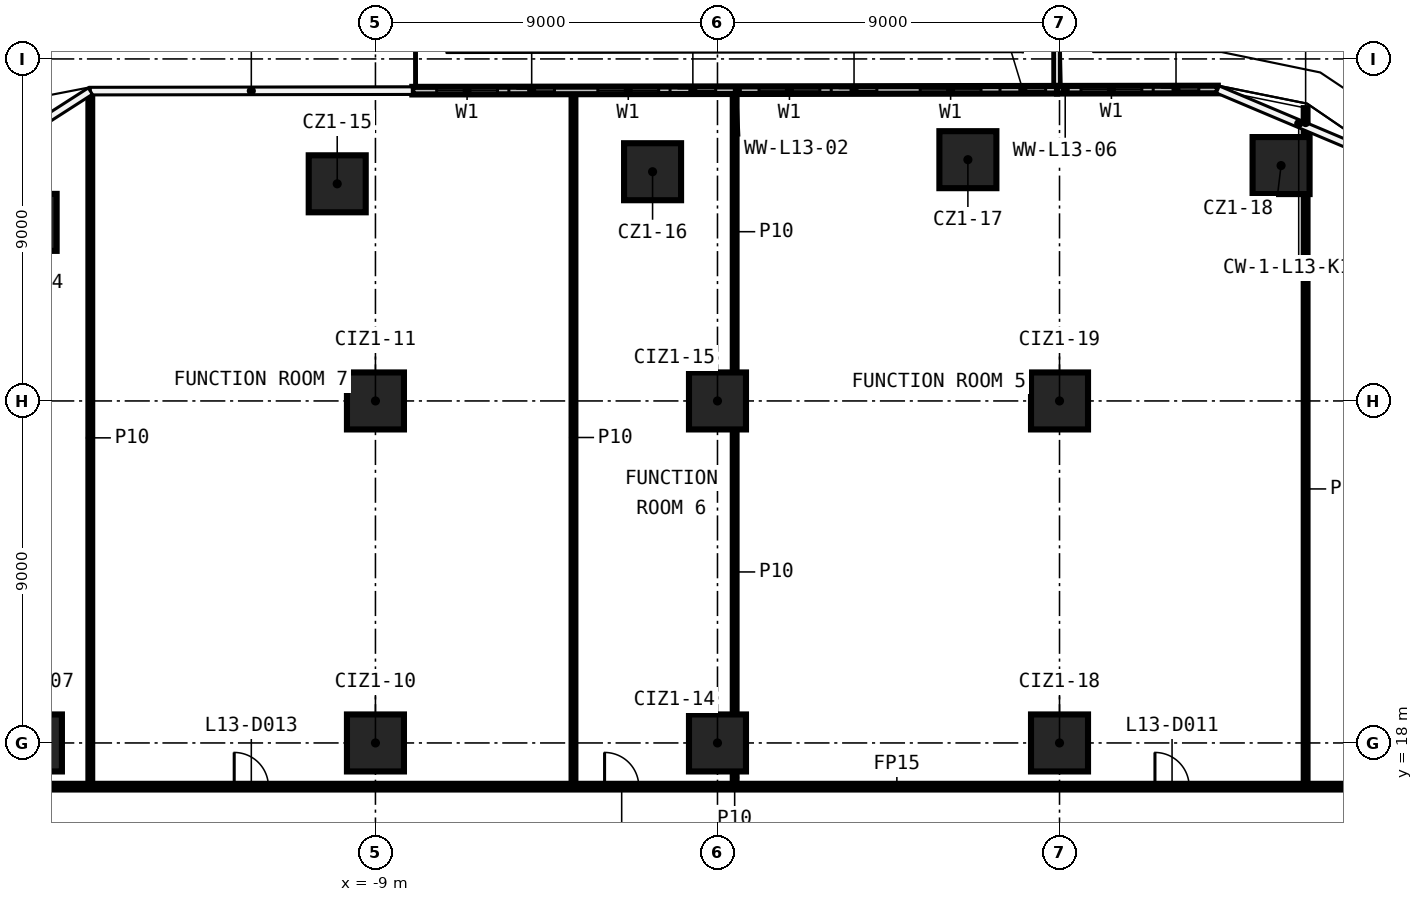
"""IFC4 building model, lengths in metres.
Left out: names, types, materials, properties, quantities, classifications, styles, units other than length and angle.
Written with IfcOpenShell. Run it as: python <this file> out.ifc"""

import sys

from ifc_helpers import new_model, si_unit, direction, frame, frame_2d, origin, origin_2d, place, context, subcontext, project, spatial, rectangle, extrude, element, fill, save


model = new_model("IFC4")
c1 = context("Model", 3, precision=1e-05, world=origin(), true_north=direction((0.0, 1.0)))
c2 = subcontext(c1, "Body", "Model", "MODEL_VIEW")
j1 = project(units=[si_unit("LENGTHUNIT", "METRE"), si_unit("PLANEANGLEUNIT", "RADIAN")], contexts=[c1])
p1 = place(None, origin())
s1 = spatial("IfcSite", under=j1, at=p1, CompositionType="ELEMENT")
p2 = place(p1, origin())
s2 = spatial("IfcBuilding", under=s1, at=p2, CompositionType="ELEMENT")
p3 = place(p2, frame((0.0, 0.0, 69.9)))
s3 = spatial("IfcBuildingStorey", under=s2, at=p3, CompositionType="ELEMENT", Elevation=69.9)
for number, where, z_axis, x_axis in (
    (1, (-18.139, 31.699, 0.0), (0.0, 0.0, 1.0), (1.0, 0.0, 0.0)),
    (2, (-10.006, 32.714, 0.0), (0.0, 0.0, 1.0), (1.0, 0.0, 0.0)),
    (3, (-1.708, 33.032, 0.0), (0.0, 0.0, 1.0), (1.0, 0.0, 0.0)),
    (4, (6.589, 33.349, 0.0), (0.0, 0.0, 1.0), (1.0, 0.0, 0.0)),
    (5, (14.83, 33.194, 0.0), (0.0, 0.0, 1.0), (1.0, 0.0, 0.0)),
    (6, (-18.0, 18.0, 0.0), (0.0, 0.0, 1.0), (1.0, 0.0, 0.0)),
    (7, (-9.0, 18.0, 0.0), (0.0, 0.0, 1.0), (1.0, 0.0, 0.0)),
    (8, (-9.0, 27.0, 0.0), (0.0, 0.0, 1.0), (1.0, 0.0, 0.0)),
    (9, (0.0, 18.0, 0.0), (0.0, 0.0, 1.0), (1.0, 0.0, 0.0)),
    (10, (0.0, 27.0, 0.0), (0.0, 0.0, 1.0), (1.0, 0.0, 0.0)),
    (11, (9.0, 18.0, 0.0), (0.0, 0.0, 1.0), (1.0, 0.0, 0.0)),
    (12, (9.0, 27.0, 0.0), (0.0, 0.0, 1.0), (1.0, 0.0, 0.0)),
):
    element("IfcColumn", number, at=place(p3, frame(where, z_axis=z_axis, x_axis=x_axis)), inside=s3, PredefinedType="COLUMN", context=c2, shape_type="SweptSolid", body=[
        extrude(rectangle(XDim=1.5, YDim=1.5, at=origin_2d()), origin(), (0.0, 0.0, 1.0), 3.3),
    ])
p4 = place(p3, frame((-19.925, 16.85, 0.0), z_axis=(0.0, 0.0, 1.0), x_axis=(1.0, 0.0, 0.0)))
e13 = element("IfcWall", 13, at=p4, inside=s3, PredefinedType="PARTITIONING", context=c2, shape_type="SweptSolid", body=[
    extrude(rectangle(XDim=39.85, YDim=0.15, at=frame_2d((19.925, 0.0))), origin(), (0.0, 0.0, 1.0), 3.3),
])
p5 = place(p4, frame((31.436, 0.0, 0.0)))
e14 = element("IfcOpeningElement", 14, at=p5, cuts=e13, PredefinedType="OPENING", context=c2, shape_type="SweptSolid", body=[
    extrude(rectangle(XDim=0.9, YDim=2.1, at=frame_2d((0.45, 1.05))), frame((0.0, 0.085, 0.0), z_axis=(0.0, -1.0, 0.0), x_axis=(1.0, 0.0, 0.0)), (0.0, 0.0, 1.0), 0.17),
])
p6 = place(p4, frame((16.954, 0.0, 0.0)))
e15 = element("IfcOpeningElement", 15, at=p6, cuts=e13, PredefinedType="OPENING", context=c2, shape_type="SweptSolid", body=[
    extrude(rectangle(XDim=0.9, YDim=2.1, at=frame_2d((0.45, 1.05))), frame((0.0, 0.085, 0.0), z_axis=(0.0, -1.0, 0.0), x_axis=(1.0, 0.0, 0.0)), (0.0, 0.0, 1.0), 0.17),
])
p7 = place(p4, frame((7.208, 0.0, 0.0)))
e16 = element("IfcOpeningElement", 16, at=p7, cuts=e13, PredefinedType="OPENING", context=c2, shape_type="SweptSolid", body=[
    extrude(rectangle(XDim=0.9, YDim=2.1, at=frame_2d((0.45, 1.05))), frame((0.0, 0.085, 0.0), z_axis=(0.0, -1.0, 0.0), x_axis=(1.0, 0.0, 0.0)), (0.0, 0.0, 1.0), 0.17),
])
p8 = place(p3, frame((15.476, 16.925, 0.0), z_axis=(0.0, 0.0, 1.0), x_axis=(0.0, 1.0, 0.0)))
e17 = element("IfcWall", 17, at=p8, inside=s3, PredefinedType="PARTITIONING", context=c2, shape_type="SweptSolid", body=[
    extrude(rectangle(XDim=15.519, YDim=0.1, at=frame_2d((7.76, 0.0))), origin(), (0.0, 0.0, 1.0), 3.3),
])
p9 = place(p3, frame((15.476, 33.944, 0.0), z_axis=(0.0, 0.0, 1.0), x_axis=(0.0, 1.0, 0.0)))
e18 = element("IfcWall", 18, at=p9, inside=s3, PredefinedType="PARTITIONING", context=c2, shape_type="SweptSolid", body=[
    extrude(rectangle(XDim=0.762, YDim=0.1, at=frame_2d((0.381, 0.0))), origin(), (0.0, 0.0, 1.0), 3.3),
])
p10 = place(p3, frame((0.452, 16.925, 0.0), z_axis=(0.0, 0.0, 1.0), x_axis=(0.0, 1.0, 0.0)))
e19 = element("IfcWall", 19, at=p10, inside=s3, PredefinedType="PARTITIONING", context=c2, shape_type="SweptSolid", body=[
    extrude(rectangle(XDim=0.325, YDim=0.1, at=frame_2d((0.163, 0.0))), origin(), (0.0, 0.0, 1.0), 3.3),
])
p11 = place(p3, frame((0.452, 18.75, 0.0), z_axis=(0.0, 0.0, 1.0), x_axis=(0.0, 1.0, 0.0)))
e20 = element("IfcWall", 20, at=p11, inside=s3, PredefinedType="PARTITIONING", context=c2, shape_type="SweptSolid", body=[
    extrude(rectangle(XDim=7.5, YDim=0.1, at=frame_2d((3.75, 0.0))), origin(), (0.0, 0.0, 1.0), 3.3),
])
p12 = place(p3, frame((0.452, 27.75, 0.0), z_axis=(0.0, 0.0, 1.0), x_axis=(0.0, 1.0, 0.0)))
e21 = element("IfcWall", 21, at=p12, inside=s3, PredefinedType="PARTITIONING", context=c2, shape_type="SweptSolid", body=[
    extrude(rectangle(XDim=7.407, YDim=0.1, at=frame_2d((3.704, 0.0))), origin(), (0.0, 0.0, 1.0), 3.3),
])
p13 = place(p3, frame((-3.789, 16.925, 0.0), z_axis=(0.0, 0.0, 1.0), x_axis=(0.0, 1.0, 0.0)))
e22 = element("IfcWall", 22, at=p13, inside=s3, PredefinedType="PARTITIONING", context=c2, shape_type="SweptSolid", body=[
    extrude(rectangle(XDim=18.226, YDim=0.1, at=frame_2d((9.113, 0.0))), origin(), (0.0, 0.0, 1.0), 3.3),
])
p14 = place(p3, frame((-16.503, 16.925, 0.0), z_axis=(0.0, 0.0, 1.0), x_axis=(0.0, 1.0, 0.0)))
e23 = element("IfcWall", 23, at=p14, inside=s3, PredefinedType="PARTITIONING", context=c2, shape_type="SweptSolid", body=[
    extrude(rectangle(XDim=18.208, YDim=0.1, at=frame_2d((9.104, 0.0))), origin(), (0.0, 0.0, 1.0), 3.3),
])
p15 = place(p3, frame((8.934, 35.19, 0.0), z_axis=(0.0, 0.0, 1.0), x_axis=(-0.999998964441, -0.001439137329, 0.0)))
e24 = element("IfcWall", 24, at=p15, inside=s3, PredefinedType="SOLIDWALL", context=c2, shape_type="SweptSolid", body=[
    extrude(rectangle(XDim=16.964, YDim=0.2, at=frame_2d((8.482, 0.0))), origin(), (0.0, 0.0, 1.0), 3.3),
])
p16 = place(p15, frame((2.0, 0.0, 0.6)))
e25 = element("IfcOpeningElement", 25, at=p16, cuts=e24, PredefinedType="OPENING", context=c2, shape_type="SweptSolid", body=[
    extrude(rectangle(XDim=1.6, YDim=2.4, at=frame_2d((0.8, 1.2))), frame((0.0, 0.11, 0.0), z_axis=(0.0, -1.0, 0.0), x_axis=(1.0, 0.0, 0.0)), (0.0, 0.0, 1.0), 0.22),
])
p17 = place(p15, frame((0.3, 0.0, 0.0)))
e26 = element("IfcOpeningElement", 26, at=p17, cuts=e24, PredefinedType="OPENING", context=c2, shape_type="SweptSolid", body=[
    extrude(rectangle(XDim=1.2, YDim=2.4, at=frame_2d((0.6, 1.2))), frame((0.0, 0.11, 0.0), z_axis=(0.0, -1.0, 0.0), x_axis=(1.0, 0.0, 0.0)), (0.0, 0.0, 1.0), 0.22),
])
p18 = place(p15, frame((6.241, 0.0, 0.6)))
e27 = element("IfcOpeningElement", 27, at=p18, cuts=e24, PredefinedType="OPENING", context=c2, shape_type="SweptSolid", body=[
    extrude(rectangle(XDim=1.6, YDim=2.4, at=frame_2d((0.8, 1.2))), frame((0.0, 0.11, 0.0), z_axis=(0.0, -1.0, 0.0), x_axis=(1.0, 0.0, 0.0)), (0.0, 0.0, 1.0), 0.22),
])
p19 = place(p15, frame((4.741, 0.0, 0.0)))
e28 = element("IfcOpeningElement", 28, at=p19, cuts=e24, PredefinedType="OPENING", context=c2, shape_type="SweptSolid", body=[
    extrude(rectangle(XDim=1.2, YDim=2.4, at=frame_2d((0.6, 1.2))), frame((0.0, 0.11, 0.0), z_axis=(0.0, -1.0, 0.0), x_axis=(1.0, 0.0, 0.0)), (0.0, 0.0, 1.0), 0.22),
])
p20 = place(p15, frame((10.482, 0.0, 0.6)))
e29 = element("IfcOpeningElement", 29, at=p20, cuts=e24, PredefinedType="OPENING", context=c2, shape_type="SweptSolid", body=[
    extrude(rectangle(XDim=1.6, YDim=2.4, at=frame_2d((0.8, 1.2))), frame((0.0, 0.11, 0.0), z_axis=(0.0, -1.0, 0.0), x_axis=(1.0, 0.0, 0.0)), (0.0, 0.0, 1.0), 0.22),
])
p21 = place(p15, frame((8.982, 0.0, 0.0)))
e30 = element("IfcOpeningElement", 30, at=p21, cuts=e24, PredefinedType="OPENING", context=c2, shape_type="SweptSolid", body=[
    extrude(rectangle(XDim=1.2, YDim=2.4, at=frame_2d((0.6, 1.2))), frame((0.0, 0.11, 0.0), z_axis=(0.0, -1.0, 0.0), x_axis=(1.0, 0.0, 0.0)), (0.0, 0.0, 1.0), 0.22),
])
p22 = place(p15, frame((14.723, 0.0, 0.6)))
e31 = element("IfcOpeningElement", 31, at=p22, cuts=e24, PredefinedType="OPENING", context=c2, shape_type="SweptSolid", body=[
    extrude(rectangle(XDim=1.6, YDim=2.4, at=frame_2d((0.8, 1.2))), frame((0.0, 0.11, 0.0), z_axis=(0.0, -1.0, 0.0), x_axis=(1.0, 0.0, 0.0)), (0.0, 0.0, 1.0), 0.22),
])
p23 = place(p15, frame((13.223, 0.0, 0.0)))
e32 = element("IfcOpeningElement", 32, at=p23, cuts=e24, PredefinedType="OPENING", context=c2, shape_type="SweptSolid", body=[
    extrude(rectangle(XDim=1.2, YDim=2.4, at=frame_2d((0.6, 1.2))), frame((0.0, 0.11, 0.0), z_axis=(0.0, -1.0, 0.0), x_axis=(1.0, 0.0, 0.0)), (0.0, 0.0, 1.0), 0.22),
])
p24 = place(p3, frame((13.166, 35.196, 0.0), z_axis=(0.0, 0.0, 1.0), x_axis=(-0.999998959596, -0.001442500374, 0.0)))
e33 = element("IfcWall", 33, at=p24, inside=s3, PredefinedType="SOLIDWALL", context=c2, shape_type="SweptSolid", body=[
    extrude(rectangle(XDim=4.231, YDim=0.2, at=frame_2d((2.116, 0.0))), origin(), (0.0, 0.0, 1.0), 3.3),
])
p25 = place(p24, frame((2.0, 0.0, 0.6)))
e34 = element("IfcOpeningElement", 34, at=p25, cuts=e33, PredefinedType="OPENING", context=c2, shape_type="SweptSolid", body=[
    extrude(rectangle(XDim=1.6, YDim=2.4, at=frame_2d((0.8, 1.2))), frame((0.0, 0.11, 0.0), z_axis=(0.0, -1.0, 0.0), x_axis=(1.0, 0.0, 0.0)), (0.0, 0.0, 1.0), 0.22),
])
p26 = place(p24, frame((0.5, 0.0, 0.0)))
e35 = element("IfcOpeningElement", 35, at=p26, cuts=e33, PredefinedType="OPENING", context=c2, shape_type="SweptSolid", body=[
    extrude(rectangle(XDim=1.2, YDim=2.4, at=frame_2d((0.6, 1.2))), frame((0.0, 0.11, 0.0), z_axis=(0.0, -1.0, 0.0), x_axis=(1.0, 0.0, 0.0)), (0.0, 0.0, 1.0), 0.22),
])
p27 = place(p5, origin())
e36 = element("IfcDoor", 36, at=p27, inside=s3, OperationType="SINGLE_SWING_RIGHT", PredefinedType="DOOR", context=c2, shape_type="SweptSolid", body=[
    extrude(rectangle(XDim=0.9, YDim=2.1, at=frame_2d((0.45, 1.05))), frame((0.0, 0.025, 0.0), z_axis=(0.0, -1.0, 0.0), x_axis=(1.0, 0.0, 0.0)), (0.0, 0.0, 1.0), 0.05),
])
fill(e14, e36)
p28 = place(p6, origin())
e37 = element("IfcDoor", 37, at=p28, inside=s3, OperationType="SINGLE_SWING_LEFT", PredefinedType="DOOR", context=c2, shape_type="SweptSolid", body=[
    extrude(rectangle(XDim=0.9, YDim=2.1, at=frame_2d((0.45, 1.05))), frame((0.0, 0.025, 0.0), z_axis=(0.0, -1.0, 0.0), x_axis=(1.0, 0.0, 0.0)), (0.0, 0.0, 1.0), 0.05),
])
fill(e15, e37)
p29 = place(p7, origin())
e38 = element("IfcDoor", 38, at=p29, inside=s3, OperationType="SINGLE_SWING_RIGHT", PredefinedType="DOOR", context=c2, shape_type="SweptSolid", body=[
    extrude(rectangle(XDim=0.9, YDim=2.1, at=frame_2d((0.45, 1.05))), frame((0.0, 0.025, 0.0), z_axis=(0.0, -1.0, 0.0), x_axis=(1.0, 0.0, 0.0)), (0.0, 0.0, 1.0), 0.05),
])
fill(e16, e38)
p30 = place(p16, origin())
e39 = element("IfcWindow", 39, at=p30, inside=s3, PartitioningType="SINGLE_PANEL", PredefinedType="WINDOW", context=c2, shape_type="SweptSolid", body=[
    extrude(rectangle(XDim=1.6, YDim=2.4, at=frame_2d((0.8, 1.2))), frame((0.0, 0.03, 0.0), z_axis=(0.0, -1.0, 0.0), x_axis=(1.0, 0.0, 0.0)), (0.0, 0.0, 1.0), 0.06),
])
fill(e25, e39)
p31 = place(p17, origin())
e40 = element("IfcDoor", 40, at=p31, inside=s3, OperationType="SLIDING_TO_LEFT", PredefinedType="DOOR", context=c2, shape_type="SweptSolid", body=[
    extrude(rectangle(XDim=1.2, YDim=2.4, at=frame_2d((0.6, 1.2))), frame((0.0, 0.025, 0.0), z_axis=(0.0, -1.0, 0.0), x_axis=(1.0, 0.0, 0.0)), (0.0, 0.0, 1.0), 0.05),
])
fill(e26, e40)
p32 = place(p18, origin())
e41 = element("IfcWindow", 41, at=p32, inside=s3, PartitioningType="SINGLE_PANEL", PredefinedType="WINDOW", context=c2, shape_type="SweptSolid", body=[
    extrude(rectangle(XDim=1.6, YDim=2.4, at=frame_2d((0.8, 1.2))), frame((0.0, 0.03, 0.0), z_axis=(0.0, -1.0, 0.0), x_axis=(1.0, 0.0, 0.0)), (0.0, 0.0, 1.0), 0.06),
])
fill(e27, e41)
p33 = place(p19, origin())
e42 = element("IfcDoor", 42, at=p33, inside=s3, OperationType="SLIDING_TO_LEFT", PredefinedType="DOOR", context=c2, shape_type="SweptSolid", body=[
    extrude(rectangle(XDim=1.2, YDim=2.4, at=frame_2d((0.6, 1.2))), frame((0.0, 0.025, 0.0), z_axis=(0.0, -1.0, 0.0), x_axis=(1.0, 0.0, 0.0)), (0.0, 0.0, 1.0), 0.05),
])
fill(e28, e42)
p34 = place(p20, origin())
e43 = element("IfcWindow", 43, at=p34, inside=s3, PartitioningType="SINGLE_PANEL", PredefinedType="WINDOW", context=c2, shape_type="SweptSolid", body=[
    extrude(rectangle(XDim=1.6, YDim=2.4, at=frame_2d((0.8, 1.2))), frame((0.0, 0.03, 0.0), z_axis=(0.0, -1.0, 0.0), x_axis=(1.0, 0.0, 0.0)), (0.0, 0.0, 1.0), 0.06),
])
fill(e29, e43)
p35 = place(p21, origin())
e44 = element("IfcDoor", 44, at=p35, inside=s3, OperationType="SLIDING_TO_LEFT", PredefinedType="DOOR", context=c2, shape_type="SweptSolid", body=[
    extrude(rectangle(XDim=1.2, YDim=2.4, at=frame_2d((0.6, 1.2))), frame((0.0, 0.025, 0.0), z_axis=(0.0, -1.0, 0.0), x_axis=(1.0, 0.0, 0.0)), (0.0, 0.0, 1.0), 0.05),
])
fill(e30, e44)
p36 = place(p22, origin())
e45 = element("IfcWindow", 45, at=p36, inside=s3, PartitioningType="SINGLE_PANEL", PredefinedType="WINDOW", context=c2, shape_type="SweptSolid", body=[
    extrude(rectangle(XDim=1.6, YDim=2.4, at=frame_2d((0.8, 1.2))), frame((0.0, 0.03, 0.0), z_axis=(0.0, -1.0, 0.0), x_axis=(1.0, 0.0, 0.0)), (0.0, 0.0, 1.0), 0.06),
])
fill(e31, e45)
p37 = place(p23, origin())
e46 = element("IfcDoor", 46, at=p37, inside=s3, OperationType="SLIDING_TO_LEFT", PredefinedType="DOOR", context=c2, shape_type="SweptSolid", body=[
    extrude(rectangle(XDim=1.2, YDim=2.4, at=frame_2d((0.6, 1.2))), frame((0.0, 0.025, 0.0), z_axis=(0.0, -1.0, 0.0), x_axis=(1.0, 0.0, 0.0)), (0.0, 0.0, 1.0), 0.05),
])
fill(e32, e46)
p38 = place(p25, origin())
e47 = element("IfcWindow", 47, at=p38, inside=s3, PartitioningType="SINGLE_PANEL", PredefinedType="WINDOW", context=c2, shape_type="SweptSolid", body=[
    extrude(rectangle(XDim=1.6, YDim=2.4, at=frame_2d((0.8, 1.2))), frame((0.0, 0.03, 0.0), z_axis=(0.0, -1.0, 0.0), x_axis=(1.0, 0.0, 0.0)), (0.0, 0.0, 1.0), 0.06),
])
fill(e34, e47)
p39 = place(p26, origin())
e48 = element("IfcDoor", 48, at=p39, inside=s3, OperationType="SLIDING_TO_LEFT", PredefinedType="DOOR", context=c2, shape_type="SweptSolid", body=[
    extrude(rectangle(XDim=1.2, YDim=2.4, at=frame_2d((0.6, 1.2))), frame((0.0, 0.025, 0.0), z_axis=(0.0, -1.0, 0.0), x_axis=(1.0, 0.0, 0.0)), (0.0, 0.0, 1.0), 0.05),
])
fill(e35, e48)
save(model, sys.argv[1])
